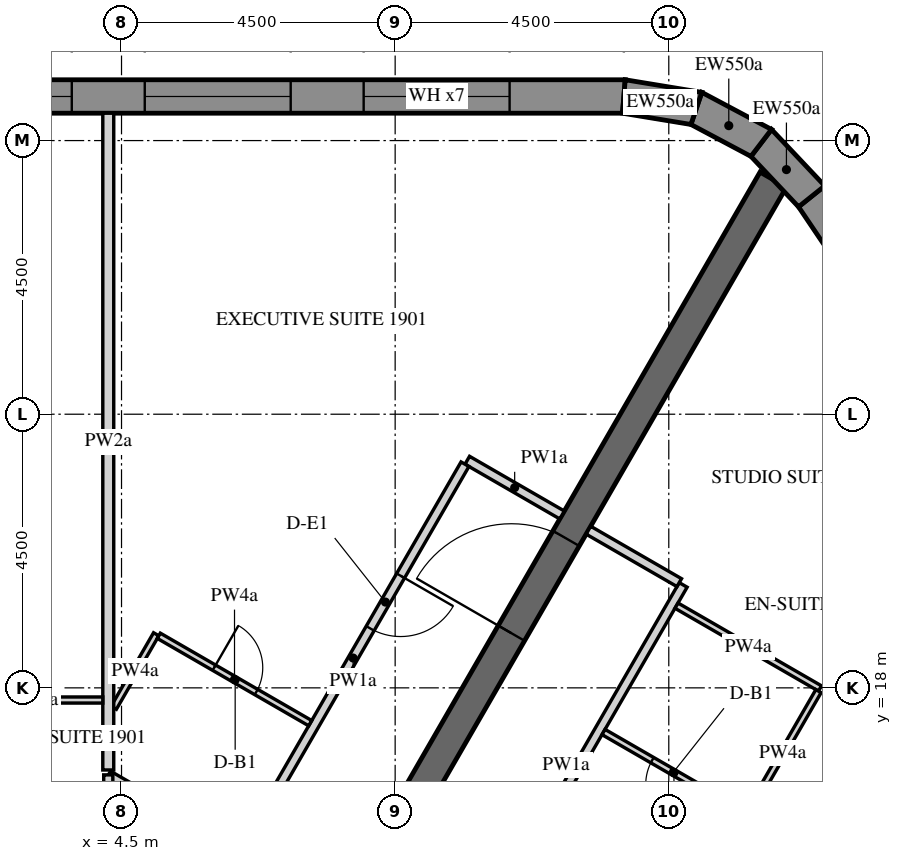
"""IFC4 building model, lengths in metres.
Left out: names, types, materials, properties, quantities, classifications, styles, units other than length and angle.
Written with IfcOpenShell. Run it as: python <this file> out.ifc"""

import sys

from ifc_helpers import new_model, si_unit, direction, frame, frame_2d, origin, place, context, subcontext, project, spatial, polyline, rectangle, outline, extrude, element, fill, save


model = new_model("IFC4")
c1 = context("Model", 3, precision=1e-05, world=origin(), true_north=direction((0.0, 1.0)))
c2 = subcontext(c1, "Body", "Model", "MODEL_VIEW")
j1 = project(units=[si_unit("LENGTHUNIT", "METRE"), si_unit("PLANEANGLEUNIT", "RADIAN")], contexts=[c1])
p1 = place(None, origin())
s1 = spatial("IfcSite", under=j1, at=p1, CompositionType="ELEMENT")
p2 = place(p1, origin())
s2 = spatial("IfcBuilding", under=s1, at=p2, CompositionType="ELEMENT")
p3 = place(p2, frame((0.0, 0.0, 246.3)))
s3 = spatial("IfcBuildingStorey", under=s2, at=p3, CompositionType="ELEMENT", Elevation=246.3)
p4 = place(p3, frame((12.761, 27.725, -0.15), z_axis=(0.0, 0.0, 1.0), x_axis=(-1.0, 0.0, 0.0)))
e1 = element("IfcWall", 1, at=p4, inside=s3, PredefinedType="SOLIDWALL", context=c2, shape_type="SweptSolid", body=[
    extrude(outline(polyline([(-0.022, -0.275), (27.783, -0.275), (27.732, 0.275), (0.022, 0.275), (-0.022, -0.275)])), origin(), (0.0, 0.0, 1.0), 3.75),
])
p5 = place(p4, frame((1.879, 0.0, 1.05)))
e2 = element("IfcOpeningElement", 2, at=p5, cuts=e1, PredefinedType="OPENING", context=c2, shape_type="SweptSolid", body=[
    extrude(rectangle(XDim=2.4, YDim=2.4, at=frame_2d((1.2, 1.2))), frame((0.0, 0.285, 0.0), z_axis=(0.0, -1.0, 0.0), x_axis=(1.0, 0.0, 0.0)), (0.0, 0.0, 1.0), 0.57),
])
p6 = place(p4, frame((5.479, 0.0, 1.05)))
e3 = element("IfcOpeningElement", 3, at=p6, cuts=e1, PredefinedType="OPENING", context=c2, shape_type="SweptSolid", body=[
    extrude(rectangle(XDim=2.4, YDim=2.4, at=frame_2d((1.2, 1.2))), frame((0.0, 0.285, 0.0), z_axis=(0.0, -1.0, 0.0), x_axis=(1.0, 0.0, 0.0)), (0.0, 0.0, 1.0), 0.57),
])
p7 = place(p4, frame((9.079, 0.0, 1.05)))
e4 = element("IfcOpeningElement", 4, at=p7, cuts=e1, PredefinedType="OPENING", context=c2, shape_type="SweptSolid", body=[
    extrude(rectangle(XDim=2.4, YDim=2.4, at=frame_2d((1.2, 1.2))), frame((0.0, 0.285, 0.0), z_axis=(0.0, -1.0, 0.0), x_axis=(1.0, 0.0, 0.0)), (0.0, 0.0, 1.0), 0.57),
])
p8 = place(p4, frame((12.679, 0.0, 1.05)))
e5 = element("IfcOpeningElement", 5, at=p8, cuts=e1, PredefinedType="OPENING", context=c2, shape_type="SweptSolid", body=[
    extrude(rectangle(XDim=2.4, YDim=2.4, at=frame_2d((1.2, 1.2))), frame((0.0, 0.285, 0.0), z_axis=(0.0, -1.0, 0.0), x_axis=(1.0, 0.0, 0.0)), (0.0, 0.0, 1.0), 0.57),
])
p9 = place(p4, frame((16.279, 0.0, 1.05)))
e6 = element("IfcOpeningElement", 6, at=p9, cuts=e1, PredefinedType="OPENING", context=c2, shape_type="SweptSolid", body=[
    extrude(rectangle(XDim=2.4, YDim=2.4, at=frame_2d((1.2, 1.2))), frame((0.0, 0.285, 0.0), z_axis=(0.0, -1.0, 0.0), x_axis=(1.0, 0.0, 0.0)), (0.0, 0.0, 1.0), 0.57),
])
p10 = place(p4, frame((19.879, 0.0, 1.05)))
e7 = element("IfcOpeningElement", 7, at=p10, cuts=e1, PredefinedType="OPENING", context=c2, shape_type="SweptSolid", body=[
    extrude(rectangle(XDim=2.4, YDim=2.4, at=frame_2d((1.2, 1.2))), frame((0.0, 0.285, 0.0), z_axis=(0.0, -1.0, 0.0), x_axis=(1.0, 0.0, 0.0)), (0.0, 0.0, 1.0), 0.57),
])
p11 = place(p4, frame((23.479, 0.0, 1.05)))
e8 = element("IfcOpeningElement", 8, at=p11, cuts=e1, PredefinedType="OPENING", context=c2, shape_type="SweptSolid", body=[
    extrude(rectangle(XDim=2.4, YDim=2.4, at=frame_2d((1.2, 1.2))), frame((0.0, 0.285, 0.0), z_axis=(0.0, -1.0, 0.0), x_axis=(1.0, 0.0, 0.0)), (0.0, 0.0, 1.0), 0.57),
])
p12 = place(p3, frame((31.371, 3.071, -0.15), z_axis=(0.0, 0.0, 1.0), x_axis=(-0.559189891278, 0.829039604297, 0.0)))
e9 = element("IfcWall", 9, at=p12, inside=s3, PredefinedType="SOLIDWALL", context=c2, shape_type="SweptSolid", body=[
    extrude(outline(polyline([(-0.026, -0.275), (27.781, -0.275), (27.736, 0.275), (0.026, 0.275), (-0.026, -0.275)])), origin(), (0.0, 0.0, 1.0), 3.75),
])
p13 = place(p12, frame((1.879, 0.0, 1.05)))
e10 = element("IfcOpeningElement", 10, at=p13, cuts=e9, PredefinedType="OPENING", context=c2, shape_type="SweptSolid", body=[
    extrude(rectangle(XDim=2.4, YDim=2.4, at=frame_2d((1.2, 1.2))), frame((0.0, 0.285, 0.0), z_axis=(0.0, -1.0, 0.0), x_axis=(1.0, 0.0, 0.0)), (0.0, 0.0, 1.0), 0.57),
])
p14 = place(p12, frame((5.479, 0.0, 1.05)))
e11 = element("IfcOpeningElement", 11, at=p14, cuts=e9, PredefinedType="OPENING", context=c2, shape_type="SweptSolid", body=[
    extrude(rectangle(XDim=2.4, YDim=2.4, at=frame_2d((1.2, 1.2))), frame((0.0, 0.285, 0.0), z_axis=(0.0, -1.0, 0.0), x_axis=(1.0, 0.0, 0.0)), (0.0, 0.0, 1.0), 0.57),
])
p15 = place(p12, frame((9.079, 0.0, 1.05)))
e12 = element("IfcOpeningElement", 12, at=p15, cuts=e9, PredefinedType="OPENING", context=c2, shape_type="SweptSolid", body=[
    extrude(rectangle(XDim=2.4, YDim=2.4, at=frame_2d((1.2, 1.2))), frame((0.0, 0.285, 0.0), z_axis=(0.0, -1.0, 0.0), x_axis=(1.0, 0.0, 0.0)), (0.0, 0.0, 1.0), 0.57),
])
p16 = place(p12, frame((12.679, 0.0, 1.05)))
e13 = element("IfcOpeningElement", 13, at=p16, cuts=e9, PredefinedType="OPENING", context=c2, shape_type="SweptSolid", body=[
    extrude(rectangle(XDim=2.4, YDim=2.4, at=frame_2d((1.2, 1.2))), frame((0.0, 0.285, 0.0), z_axis=(0.0, -1.0, 0.0), x_axis=(1.0, 0.0, 0.0)), (0.0, 0.0, 1.0), 0.57),
])
p17 = place(p12, frame((16.279, 0.0, 1.05)))
e14 = element("IfcOpeningElement", 14, at=p17, cuts=e9, PredefinedType="OPENING", context=c2, shape_type="SweptSolid", body=[
    extrude(rectangle(XDim=2.4, YDim=2.4, at=frame_2d((1.2, 1.2))), frame((0.0, 0.285, 0.0), z_axis=(0.0, -1.0, 0.0), x_axis=(1.0, 0.0, 0.0)), (0.0, 0.0, 1.0), 0.57),
])
p18 = place(p12, frame((19.879, 0.0, 1.05)))
e15 = element("IfcOpeningElement", 15, at=p18, cuts=e9, PredefinedType="OPENING", context=c2, shape_type="SweptSolid", body=[
    extrude(rectangle(XDim=2.4, YDim=2.4, at=frame_2d((1.2, 1.2))), frame((0.0, 0.285, 0.0), z_axis=(0.0, -1.0, 0.0), x_axis=(1.0, 0.0, 0.0)), (0.0, 0.0, 1.0), 0.57),
])
p19 = place(p12, frame((23.479, 0.0, 1.05)))
e16 = element("IfcOpeningElement", 16, at=p19, cuts=e9, PredefinedType="OPENING", context=c2, shape_type="SweptSolid", body=[
    extrude(rectangle(XDim=2.4, YDim=2.4, at=frame_2d((1.2, 1.2))), frame((0.0, 0.285, 0.0), z_axis=(0.0, -1.0, 0.0), x_axis=(1.0, 0.0, 0.0)), (0.0, 0.0, 1.0), 0.57),
])
p20 = place(p3, frame((15.849, 26.083, -0.15), z_axis=(0.0, 0.0, 1.0), x_axis=(-0.686196220404, 0.727416488061, 0.0)))
e17 = element("IfcWall", 17, at=p20, inside=s3, PredefinedType="SOLIDWALL", context=c2, shape_type="SweptSolid", body=[
    extrude(outline(polyline([(-0.022, -0.275), (1.253, -0.275), (1.163, 0.275), (0.022, 0.275), (-0.022, -0.275)])), origin(), (0.0, 0.0, 1.0), 3.75),
])
p21 = place(p3, frame((15.02, 26.962, -0.15), z_axis=(0.0, 0.0, 1.0), x_axis=(-0.882950818639, 0.469465495926, 0.0)))
e18 = element("IfcWall", 18, at=p21, inside=s3, PredefinedType="SOLIDWALL", context=c2, shape_type="SweptSolid", body=[
    extrude(outline(polyline([(-0.045, -0.275), (1.253, -0.275), (1.163, 0.275), (0.045, 0.275), (-0.045, -0.275)])), origin(), (0.0, 0.0, 1.0), 3.75),
])
p22 = place(p3, frame((13.953, 27.529, -0.15), z_axis=(0.0, 0.0, 1.0), x_axis=(-0.986751945211, 0.162236243244, 0.0)))
e19 = element("IfcWall", 19, at=p22, inside=s3, PredefinedType="SOLIDWALL", context=c2, shape_type="SweptSolid", body=[
    extrude(outline(polyline([(-0.045, -0.275), (1.231, -0.275), (1.186, 0.275), (0.045, 0.275), (-0.045, -0.275)])), origin(), (0.0, 0.0, 1.0), 3.75),
])
p23 = place(p3, frame((7.506, 13.0, -0.15), z_axis=(0.0, 0.0, 1.0), x_axis=(0.499988271576, 0.866032175087, 0.0)))
e20 = element("IfcWall", 20, at=p23, inside=s3, PredefinedType="SHEAR", context=c2, shape_type="SweptSolid", body=[
    extrude(rectangle(XDim=15.424, YDim=0.5, at=frame_2d((7.712, 0.0))), origin(), (0.0, 0.0, 1.0), 3.75),
])
p24 = place(p23, frame((6.812, 0.0, 0.15)))
e21 = element("IfcOpeningElement", 21, at=p24, cuts=e20, PredefinedType="OPENING", context=c2, shape_type="SweptSolid", body=[
    extrude(rectangle(XDim=1.8, YDim=2.4, at=frame_2d((0.9, 1.2))), frame((0.0, 0.26, 0.0), z_axis=(0.0, -1.0, 0.0), x_axis=(1.0, 0.0, 0.0)), (0.0, 0.0, 1.0), 0.52),
])
p25 = place(p3, frame((11.745, 20.843, 0.0), z_axis=(0.0, 0.0, 1.0), x_axis=(-0.865989075817, 0.500062916607, 0.0)))
e22 = element("IfcWall", 22, at=p25, inside=s3, PredefinedType="PARTITIONING", context=c2, shape_type="SweptSolid", body=[
    extrude(rectangle(XDim=1.8, YDim=0.15, at=frame_2d((0.9, 0.0))), origin(), (0.0, 0.0, 1.0), 2.838),
])
p26 = place(p3, frame((10.149, 21.678, 0.0), z_axis=(0.0, 0.0, 1.0), x_axis=(-0.500020076982, -0.866013812023, 0.0)))
e23 = element("IfcWall", 23, at=p26, inside=s3, PredefinedType="PARTITIONING", context=c2, shape_type="SweptSolid", body=[
    extrude(rectangle(XDim=7.361, YDim=0.15, at=frame_2d((3.681, 0.0))), origin(), (0.0, 0.0, 1.0), 2.838),
])
p27 = place(p26, frame((2.118, 0.0, 0.0)))
e24 = element("IfcOpeningElement", 24, at=p27, cuts=e23, PredefinedType="OPENING", context=c2, shape_type="SweptSolid", body=[
    extrude(rectangle(XDim=1.0, YDim=2.1, at=frame_2d((0.5, 1.05))), frame((0.0, 0.085, 0.0), z_axis=(0.0, -1.0, 0.0), x_axis=(1.0, 0.0, 0.0)), (0.0, 0.0, 1.0), 0.17),
])
p28 = place(p3, frame((6.403, 15.341, 0.0), z_axis=(0.0, 0.0, 1.0), x_axis=(-0.8660013066, 0.500041735226, 0.0)))
e25 = element("IfcWall", 25, at=p28, inside=s3, PredefinedType="PARTITIONING", context=c2, shape_type="SweptSolid", body=[
    extrude(rectangle(XDim=2.449, YDim=0.15, at=frame_2d((1.225, 0.0))), origin(), (0.0, 0.0, 1.0), 2.838),
])
p29 = place(p3, frame((4.282, 16.569, 0.0), z_axis=(0.0, 0.0, 1.0), x_axis=(0.0, -1.0, 0.0)))
e26 = element("IfcWall", 26, at=p29, inside=s3, PredefinedType="PARTITIONING", context=c2, shape_type="SweptSolid", body=[
    extrude(rectangle(XDim=1.569, YDim=0.15, at=frame_2d((0.785, 0.0))), origin(), (0.0, 0.0, 1.0), 2.838),
])
p30 = place(p3, frame((9.887, 13.025, 0.0), z_axis=(0.0, 0.0, 1.0), x_axis=(0.499985955615, 0.866033512162, 0.0)))
e27 = element("IfcWall", 27, at=p30, inside=s3, PredefinedType="PARTITIONING", context=c2, shape_type="SweptSolid", body=[
    extrude(rectangle(XDim=7.699, YDim=0.15, at=frame_2d((3.85, 0.0))), origin(), (0.0, 0.0, 1.0), 2.838),
])
p31 = place(p30, frame((2.106, 0.0, 0.0)))
e28 = element("IfcOpeningElement", 28, at=p31, cuts=e27, PredefinedType="OPENING", context=c2, shape_type="SweptSolid", body=[
    extrude(rectangle(XDim=1.0, YDim=2.1, at=frame_2d((0.5, 1.05))), frame((0.0, 0.085, 0.0), z_axis=(0.0, -1.0, 0.0), x_axis=(1.0, 0.0, 0.0)), (0.0, 0.0, 1.0), 0.17),
])
p32 = place(p3, frame((13.672, 19.73, 0.0), z_axis=(0.0, 0.0, 1.0), x_axis=(-0.866074815912, 0.499914405916, 0.0)))
e29 = element("IfcWall", 29, at=p32, inside=s3, PredefinedType="PARTITIONING", context=c2, shape_type="SweptSolid", body=[
    extrude(rectangle(XDim=1.725, YDim=0.15, at=frame_2d((0.862, 0.0))), origin(), (0.0, 0.0, 1.0), 2.838),
])
p33 = place(p3, frame((4.372, 17.673, 0.0), z_axis=(0.0, 0.0, 1.0), x_axis=(0.50007068215, 0.86598459158, 0.0)))
e30 = element("IfcWall", 30, at=p33, inside=s3, PredefinedType="PARTITIONING", context=c2, shape_type="SweptSolid", body=[
    extrude(rectangle(XDim=1.396, YDim=0.1, at=frame_2d((0.698, 0.0))), origin(), (0.0, 0.0, 1.0), 2.838),
])
p34 = place(p3, frame((5.113, 18.857, 0.0), z_axis=(0.0, 0.0, 1.0), x_axis=(0.866039941686, -0.499974818771, 0.0)))
e31 = element("IfcWall", 31, at=p34, inside=s3, PredefinedType="PARTITIONING", context=c2, shape_type="SweptSolid", body=[
    extrude(rectangle(XDim=2.875, YDim=0.1, at=frame_2d((1.438, 0.0))), origin(), (0.0, 0.0, 1.0), 2.838),
])
p35 = place(p34, frame((1.05, 0.0, 0.0)))
e32 = element("IfcOpeningElement", 32, at=p35, cuts=e31, PredefinedType="OPENING", context=c2, shape_type="SweptSolid", body=[
    extrude(rectangle(XDim=0.8, YDim=2.1, at=frame_2d((0.4, 1.05))), frame((0.0, 0.06, 0.0), z_axis=(0.0, -1.0, 0.0), x_axis=(1.0, 0.0, 0.0)), (0.0, 0.0, 1.0), 0.12),
])
p36 = place(p3, frame((4.282, 27.45, 0.0), z_axis=(0.0, 0.0, 1.0), x_axis=(0.0, -1.0, 0.0)))
e33 = element("IfcWall", 33, at=p36, inside=s3, PredefinedType="PARTITIONING", context=c2, shape_type="SweptSolid", body=[
    extrude(rectangle(XDim=10.801, YDim=0.18, at=frame_2d((5.4, 0.0))), origin(), (0.0, 0.0, 1.0), 2.838),
])
p37 = place(p3, frame((1.932, 17.8, 0.0), z_axis=(0.0, 0.0, 1.0), x_axis=(1.0, 0.0, 0.0)))
e34 = element("IfcWall", 34, at=p37, inside=s3, PredefinedType="PARTITIONING", context=c2, shape_type="SweptSolid", body=[
    extrude(rectangle(XDim=2.26, YDim=0.1, at=frame_2d((1.13, 0.0))), origin(), (0.0, 0.0, 1.0), 2.838),
])
p38 = place(p3, frame((20.363, 18.9, 0.0), z_axis=(0.0, 0.0, 1.0), x_axis=(-0.829027307641, -0.559208121531, 0.0)))
e35 = element("IfcWall", 35, at=p38, inside=s3, PredefinedType="PARTITIONING", context=c2, shape_type="SweptSolid", body=[
    extrude(rectangle(XDim=12.039, YDim=0.18, at=frame_2d((6.02, 0.0))), origin(), (0.0, 0.0, 1.0), 2.838),
])
p39 = place(p3, frame((13.627, 19.352, 0.0), z_axis=(0.0, 0.0, 1.0), x_axis=(0.866012511928, -0.500022328685, 0.0)))
e36 = element("IfcWall", 36, at=p39, inside=s3, PredefinedType="PARTITIONING", context=c2, shape_type="SweptSolid", body=[
    extrude(rectangle(XDim=2.725, YDim=0.1, at=frame_2d((1.363, 0.0))), origin(), (0.0, 0.0, 1.0), 2.838),
])
p40 = place(p3, frame((15.962, 17.947, 0.0), z_axis=(0.0, 0.0, 1.0), x_axis=(-0.500016218704, -0.866016039709, 0.0)))
e37 = element("IfcWall", 37, at=p40, inside=s3, PredefinedType="PARTITIONING", context=c2, shape_type="SweptSolid", body=[
    extrude(rectangle(XDim=2.35, YDim=0.1, at=frame_2d((1.175, 0.0))), origin(), (0.0, 0.0, 1.0), 2.838),
])
p41 = place(p3, frame((14.743, 15.936, 0.0), z_axis=(0.0, 0.0, 1.0), x_axis=(-0.86604424267, 0.499967368674, 0.0)))
e38 = element("IfcWall", 38, at=p41, inside=s3, PredefinedType="PARTITIONING", context=c2, shape_type="SweptSolid", body=[
    extrude(rectangle(XDim=2.675, YDim=0.1, at=frame_2d((1.337, 0.0))), origin(), (0.0, 0.0, 1.0), 2.838),
])
p42 = place(p41, frame((0.95, 0.0, 0.0)))
e39 = element("IfcOpeningElement", 39, at=p42, cuts=e38, PredefinedType="OPENING", context=c2, shape_type="SweptSolid", body=[
    extrude(rectangle(XDim=0.8, YDim=2.1, at=frame_2d((0.4, 1.05))), frame((0.0, 0.06, 0.0), z_axis=(0.0, -1.0, 0.0), x_axis=(1.0, 0.0, 0.0)), (0.0, 0.0, 1.0), 0.12),
])
p43 = place(p5, frame((0.0, 0.205, 0.0)))
e40 = element("IfcWindow", 40, at=p43, inside=s3, PartitioningType="DOUBLE_PANEL_VERTICAL", PredefinedType="WINDOW", context=c2, shape_type="SweptSolid", body=[
    extrude(rectangle(XDim=2.4, YDim=2.4, at=frame_2d((1.2, 1.2))), frame((0.0, 0.03, 0.0), z_axis=(0.0, -1.0, 0.0), x_axis=(1.0, 0.0, 0.0)), (0.0, 0.0, 1.0), 0.06),
])
fill(e2, e40)
p44 = place(p6, frame((0.0, 0.205, 0.0)))
e41 = element("IfcWindow", 41, at=p44, inside=s3, PartitioningType="DOUBLE_PANEL_VERTICAL", PredefinedType="WINDOW", context=c2, shape_type="SweptSolid", body=[
    extrude(rectangle(XDim=2.4, YDim=2.4, at=frame_2d((1.2, 1.2))), frame((0.0, 0.03, 0.0), z_axis=(0.0, -1.0, 0.0), x_axis=(1.0, 0.0, 0.0)), (0.0, 0.0, 1.0), 0.06),
])
fill(e3, e41)
p45 = place(p7, frame((0.0, 0.205, 0.0)))
e42 = element("IfcWindow", 42, at=p45, inside=s3, PartitioningType="DOUBLE_PANEL_VERTICAL", PredefinedType="WINDOW", context=c2, shape_type="SweptSolid", body=[
    extrude(rectangle(XDim=2.4, YDim=2.4, at=frame_2d((1.2, 1.2))), frame((0.0, 0.03, 0.0), z_axis=(0.0, -1.0, 0.0), x_axis=(1.0, 0.0, 0.0)), (0.0, 0.0, 1.0), 0.06),
])
fill(e4, e42)
p46 = place(p24, origin())
e43 = element("IfcDoor", 43, at=p46, inside=s3, OperationType="DOUBLE_DOOR_SINGLE_SWING", PredefinedType="DOOR", context=c2, shape_type="SweptSolid", body=[
    extrude(rectangle(XDim=1.8, YDim=2.4, at=frame_2d((0.9, 1.2))), frame((0.0, 0.025, 0.0), z_axis=(0.0, -1.0, 0.0), x_axis=(1.0, 0.0, 0.0)), (0.0, 0.0, 1.0), 0.05),
])
fill(e21, e43)
p47 = place(p27, origin())
e44 = element("IfcDoor", 44, at=p47, inside=s3, OperationType="SINGLE_SWING_LEFT", PredefinedType="DOOR", context=c2, shape_type="SweptSolid", body=[
    extrude(rectangle(XDim=1.0, YDim=2.1, at=frame_2d((0.5, 1.05))), frame((0.0, 0.025, 0.0), z_axis=(0.0, -1.0, 0.0), x_axis=(1.0, 0.0, 0.0)), (0.0, 0.0, 1.0), 0.05),
])
fill(e24, e44)
p48 = place(p35, origin())
e45 = element("IfcDoor", 45, at=p48, inside=s3, OperationType="SINGLE_SWING_RIGHT", PredefinedType="DOOR", context=c2, shape_type="SweptSolid", body=[
    extrude(rectangle(XDim=0.8, YDim=2.1, at=frame_2d((0.4, 1.05))), frame((0.0, 0.025, 0.0), z_axis=(0.0, -1.0, 0.0), x_axis=(1.0, 0.0, 0.0)), (0.0, 0.0, 1.0), 0.05),
])
fill(e32, e45)
p49 = place(p42, origin())
e46 = element("IfcDoor", 46, at=p49, inside=s3, OperationType="SINGLE_SWING_RIGHT", PredefinedType="DOOR", context=c2, shape_type="SweptSolid", body=[
    extrude(rectangle(XDim=0.8, YDim=2.1, at=frame_2d((0.4, 1.05))), frame((0.0, 0.025, 0.0), z_axis=(0.0, -1.0, 0.0), x_axis=(1.0, 0.0, 0.0)), (0.0, 0.0, 1.0), 0.05),
])
fill(e39, e46)
save(model, sys.argv[1])
